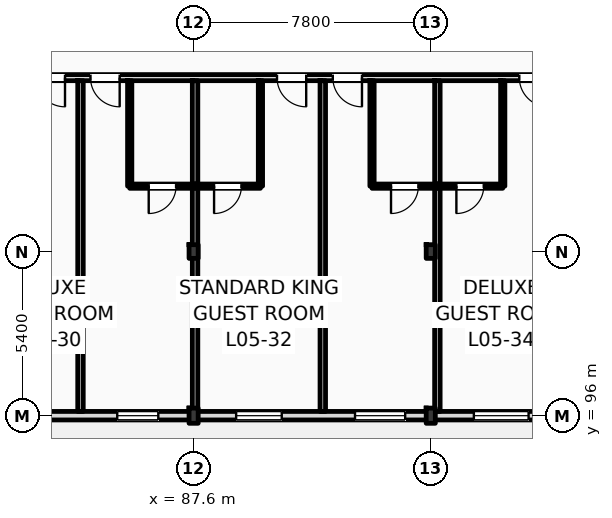
"""IFC4 building model, lengths in metres.
Left out: names, types, materials, properties, quantities, classifications, styles, units other than length and angle.
Written with IfcOpenShell. Run it as: python <this file> out.ifc"""

import sys

from ifc_helpers import new_model, si_unit, direction, frame, frame_2d, origin, origin_2d, place, context, subcontext, project, spatial, rectangle, i_section, extrude, element, fill, save


model = new_model("IFC4")
c1 = context("Model", 3, precision=1e-05, world=origin(), true_north=direction((0.0, 1.0)))
c2 = subcontext(c1, "Body", "Model", "MODEL_VIEW")
j1 = project(units=[si_unit("LENGTHUNIT", "METRE"), si_unit("PLANEANGLEUNIT", "RADIAN")], contexts=[c1])
p1 = place(None, origin())
s1 = spatial("IfcSite", under=j1, at=p1, CompositionType="ELEMENT")
p2 = place(p1, origin())
s2 = spatial("IfcBuilding", under=s1, at=p2, CompositionType="ELEMENT")
p3 = place(p2, frame((0.0, 0.0, 24.6)))
s3 = spatial("IfcBuildingStorey", under=s2, at=p3, CompositionType="ELEMENT", Elevation=24.6)
p4 = place(p3, frame((87.6, 96.0, 0.0), z_axis=(0.0, 0.0, 1.0), x_axis=(1.0, 0.0, 0.0)))
e1 = element("IfcColumn", 1, at=p4, inside=s3, PredefinedType="COLUMN", context=c2, shape_type="SweptSolid", body=[
    extrude(i_section(OverallWidth=0.3, OverallDepth=0.5, WebThickness=0.014, FlangeThickness=0.028, FilletRadius=0.027, at=origin_2d()), origin(), (0.0, 0.0, 1.0), 3.6),
])
p5 = place(p3, frame((87.6, 101.4, 0.0), z_axis=(0.0, 0.0, 1.0), x_axis=(1.0, 0.0, 0.0)))
e2 = element("IfcColumn", 2, at=p5, inside=s3, PredefinedType="COLUMN", context=c2, shape_type="SweptSolid", body=[
    extrude(i_section(OverallWidth=0.3, OverallDepth=0.45, WebThickness=0.014, FlangeThickness=0.026, FilletRadius=0.027, at=origin_2d()), origin(), (0.0, 0.0, 1.0), 3.6),
])
p6 = place(p3, frame((95.4, 96.0, 0.0), z_axis=(0.0, 0.0, 1.0), x_axis=(1.0, 0.0, 0.0)))
e3 = element("IfcColumn", 3, at=p6, inside=s3, PredefinedType="COLUMN", context=c2, shape_type="SweptSolid", body=[
    extrude(i_section(OverallWidth=0.3, OverallDepth=0.5, WebThickness=0.014, FlangeThickness=0.028, FilletRadius=0.027, at=origin_2d()), origin(), (0.0, 0.0, 1.0), 3.6),
])
p7 = place(p3, frame((95.4, 101.4, 0.0), z_axis=(0.0, 0.0, 1.0), x_axis=(1.0, 0.0, 0.0)))
e4 = element("IfcColumn", 4, at=p7, inside=s3, PredefinedType="COLUMN", context=c2, shape_type="SweptSolid", body=[
    extrude(i_section(OverallWidth=0.3, OverallDepth=0.45, WebThickness=0.014, FlangeThickness=0.026, FilletRadius=0.027, at=origin_2d()), origin(), (0.0, 0.0, 1.0), 3.6),
])
p8 = place(p3, frame((25.2, 96.0, 0.0), z_axis=(0.0, 0.0, 1.0), x_axis=(1.0, 0.0, 0.0)))
e5 = element("IfcWall", 5, at=p8, inside=s3, PredefinedType="STANDARD", context=c2, shape_type="SweptSolid", body=[
    extrude(rectangle(XDim=94.8, YDim=0.28, at=frame_2d((47.4, 0.0))), origin(), (0.0, 0.0, 1.0), 2.78),
])
p9 = place(p8, frame((16.539, 0.0, 0.9)))
e6 = element("IfcOpeningElement", 6, at=p9, cuts=e5, PredefinedType="OPENING", context=c2, shape_type="SweptSolid", body=[
    extrude(rectangle(XDim=1.75, YDim=1.7, at=frame_2d((0.875, 0.85))), frame((0.0, 0.15, 0.0), z_axis=(0.0, -1.0, 0.0), x_axis=(1.0, 0.0, 0.0)), (0.0, 0.0, 1.0), 0.3),
])
p10 = place(p8, frame((20.367, 0.0, 0.9)))
e7 = element("IfcOpeningElement", 7, at=p10, cuts=e5, PredefinedType="OPENING", context=c2, shape_type="SweptSolid", body=[
    extrude(rectangle(XDim=2.0, YDim=1.7, at=frame_2d((1.0, 0.85))), frame((0.0, 0.15, 0.0), z_axis=(0.0, -1.0, 0.0), x_axis=(1.0, 0.0, 0.0)), (0.0, 0.0, 1.0), 0.3),
])
p11 = place(p8, frame((24.326, 0.0, 0.9)))
e8 = element("IfcOpeningElement", 8, at=p11, cuts=e5, PredefinedType="OPENING", context=c2, shape_type="SweptSolid", body=[
    extrude(rectangle(XDim=2.3, YDim=1.7, at=frame_2d((1.15, 0.85))), frame((0.0, 0.15, 0.0), z_axis=(0.0, -1.0, 0.0), x_axis=(1.0, 0.0, 0.0)), (0.0, 0.0, 1.0), 0.3),
])
p12 = place(p8, frame((27.684, 0.0, 0.9)))
e9 = element("IfcOpeningElement", 9, at=p12, cuts=e5, PredefinedType="OPENING", context=c2, shape_type="SweptSolid", body=[
    extrude(rectangle(XDim=2.6, YDim=1.7, at=frame_2d((1.3, 0.85))), frame((0.0, 0.15, 0.0), z_axis=(0.0, -1.0, 0.0), x_axis=(1.0, 0.0, 0.0)), (0.0, 0.0, 1.0), 0.3),
])
p13 = place(p8, frame((32.083, 0.0, 0.9)))
e10 = element("IfcOpeningElement", 10, at=p13, cuts=e5, PredefinedType="OPENING", context=c2, shape_type="SweptSolid", body=[
    extrude(rectangle(XDim=2.419, YDim=1.7, at=frame_2d((1.209, 0.85))), frame((0.0, 0.15, 0.0), z_axis=(0.0, -1.0, 0.0), x_axis=(1.0, 0.0, 0.0)), (0.0, 0.0, 1.0), 0.3),
])
p14 = place(p8, frame((35.322, 0.0, 0.9)))
e11 = element("IfcOpeningElement", 11, at=p14, cuts=e5, PredefinedType="OPENING", context=c2, shape_type="SweptSolid", body=[
    extrude(rectangle(XDim=2.868, YDim=1.7, at=frame_2d((1.434, 0.85))), frame((0.0, 0.15, 0.0), z_axis=(0.0, -1.0, 0.0), x_axis=(1.0, 0.0, 0.0)), (0.0, 0.0, 1.0), 0.3),
])
p15 = place(p8, frame((56.015, 0.0, 0.9)))
e12 = element("IfcOpeningElement", 12, at=p15, cuts=e5, PredefinedType="OPENING", context=c2, shape_type="SweptSolid", body=[
    extrude(rectangle(XDim=1.2, YDim=1.7, at=frame_2d((0.6, 0.85))), frame((0.0, 0.15, 0.0), z_axis=(0.0, -1.0, 0.0), x_axis=(1.0, 0.0, 0.0)), (0.0, 0.0, 1.0), 0.3),
])
p16 = place(p8, frame((59.888, 0.0, 0.9)))
e13 = element("IfcOpeningElement", 13, at=p16, cuts=e5, PredefinedType="OPENING", context=c2, shape_type="SweptSolid", body=[
    extrude(rectangle(XDim=1.35, YDim=1.7, at=frame_2d((0.675, 0.85))), frame((0.0, 0.15, 0.0), z_axis=(0.0, -1.0, 0.0), x_axis=(1.0, 0.0, 0.0)), (0.0, 0.0, 1.0), 0.3),
])
p17 = place(p8, frame((63.799, 0.0, 0.9)))
e14 = element("IfcOpeningElement", 14, at=p17, cuts=e5, PredefinedType="OPENING", context=c2, shape_type="SweptSolid", body=[
    extrude(rectangle(XDim=1.5, YDim=1.7, at=frame_2d((0.75, 0.85))), frame((0.0, 0.15, 0.0), z_axis=(0.0, -1.0, 0.0), x_axis=(1.0, 0.0, 0.0)), (0.0, 0.0, 1.0), 0.3),
])
p18 = place(p8, frame((67.709, 0.0, 0.9)))
e15 = element("IfcOpeningElement", 15, at=p18, cuts=e5, PredefinedType="OPENING", context=c2, shape_type="SweptSolid", body=[
    extrude(rectangle(XDim=1.65, YDim=1.7, at=frame_2d((0.825, 0.85))), frame((0.0, 0.15, 0.0), z_axis=(0.0, -1.0, 0.0), x_axis=(1.0, 0.0, 0.0)), (0.0, 0.0, 1.0), 0.3),
])
p19 = place(p8, frame((71.618, 0.0, 0.9)))
e16 = element("IfcOpeningElement", 16, at=p19, cuts=e5, PredefinedType="OPENING", context=c2, shape_type="SweptSolid", body=[
    extrude(rectangle(XDim=1.8, YDim=1.7, at=frame_2d((0.9, 0.85))), frame((0.0, 0.15, 0.0), z_axis=(0.0, -1.0, 0.0), x_axis=(1.0, 0.0, 0.0)), (0.0, 0.0, 1.0), 0.3),
])
p20 = place(p8, frame((75.129, 0.0, 0.9)))
e17 = element("IfcOpeningElement", 17, at=p20, cuts=e5, PredefinedType="OPENING", context=c2, shape_type="SweptSolid", body=[
    extrude(rectangle(XDim=1.95, YDim=1.7, at=frame_2d((0.975, 0.85))), frame((0.0, 0.15, 0.0), z_axis=(0.0, -1.0, 0.0), x_axis=(1.0, 0.0, 0.0)), (0.0, 0.0, 1.0), 0.3),
])
p21 = place(p8, frame((79.439, 0.0, 0.9)))
e18 = element("IfcOpeningElement", 18, at=p21, cuts=e5, PredefinedType="OPENING", context=c2, shape_type="SweptSolid", body=[
    extrude(rectangle(XDim=2.1, YDim=1.7, at=frame_2d((1.05, 0.85))), frame((0.0, 0.15, 0.0), z_axis=(0.0, -1.0, 0.0), x_axis=(1.0, 0.0, 0.0)), (0.0, 0.0, 1.0), 0.3),
])
p22 = place(p8, frame((83.349, 0.0, 0.9)))
e19 = element("IfcOpeningElement", 19, at=p22, cuts=e5, PredefinedType="OPENING", context=c2, shape_type="SweptSolid", body=[
    extrude(rectangle(XDim=2.25, YDim=1.7, at=frame_2d((1.125, 0.85))), frame((0.0, 0.15, 0.0), z_axis=(0.0, -1.0, 0.0), x_axis=(1.0, 0.0, 0.0)), (0.0, 0.0, 1.0), 0.3),
])
p23 = place(p8, frame((87.258, 0.0, 0.9)))
e20 = element("IfcOpeningElement", 20, at=p23, cuts=e5, PredefinedType="OPENING", context=c2, shape_type="SweptSolid", body=[
    extrude(rectangle(XDim=2.4, YDim=1.7, at=frame_2d((1.2, 0.85))), frame((0.0, 0.15, 0.0), z_axis=(0.0, -1.0, 0.0), x_axis=(1.0, 0.0, 0.0)), (0.0, 0.0, 1.0), 0.3),
])
p24 = place(p8, frame((91.204, 0.0, 0.9)))
e21 = element("IfcOpeningElement", 21, at=p24, cuts=e5, PredefinedType="OPENING", context=c2, shape_type="SweptSolid", body=[
    extrude(rectangle(XDim=2.55, YDim=1.7, at=frame_2d((1.275, 0.85))), frame((0.0, 0.15, 0.0), z_axis=(0.0, -1.0, 0.0), x_axis=(1.0, 0.0, 0.0)), (0.0, 0.0, 1.0), 0.3),
])
p25 = place(p3, frame((79.76, 107.12, 0.0), z_axis=(0.0, 0.0, 1.0), x_axis=(1.0, 0.0, 0.0)))
e22 = element("IfcWall", 22, at=p25, inside=s3, PredefinedType="PARTITIONING", context=c2, shape_type="SweptSolid", body=[
    extrude(rectangle(XDim=40.1, YDim=0.2, at=frame_2d((20.05, 0.0))), origin(), (0.0, 0.0, 1.0), 3.34),
])
p26 = place(p25, frame((2.65, 0.0, 0.0)))
e23 = element("IfcOpeningElement", 23, at=p26, cuts=e22, PredefinedType="OPENING", context=c2, shape_type="SweptSolid", body=[
    extrude(rectangle(XDim=0.96, YDim=2.2, at=frame_2d((0.48, 1.1))), frame((0.0, 0.11, 0.0), z_axis=(0.0, -1.0, 0.0), x_axis=(1.0, 0.0, 0.0)), (0.0, 0.0, 1.0), 0.22),
])
p27 = place(p25, frame((4.448, 0.0, 0.0)))
e24 = element("IfcOpeningElement", 24, at=p27, cuts=e22, PredefinedType="OPENING", context=c2, shape_type="SweptSolid", body=[
    extrude(rectangle(XDim=0.96, YDim=2.2, at=frame_2d((0.48, 1.1))), frame((0.0, 0.11, 0.0), z_axis=(0.0, -1.0, 0.0), x_axis=(1.0, 0.0, 0.0)), (0.0, 0.0, 1.0), 0.22),
])
p28 = place(p25, frame((10.583, 0.0, 0.0)))
e25 = element("IfcOpeningElement", 25, at=p28, cuts=e22, PredefinedType="OPENING", context=c2, shape_type="SweptSolid", body=[
    extrude(rectangle(XDim=0.96, YDim=2.2, at=frame_2d((0.48, 1.1))), frame((0.0, 0.11, 0.0), z_axis=(0.0, -1.0, 0.0), x_axis=(1.0, 0.0, 0.0)), (0.0, 0.0, 1.0), 0.22),
])
p29 = place(p25, frame((12.418, 0.0, 0.0)))
e26 = element("IfcOpeningElement", 26, at=p29, cuts=e22, PredefinedType="OPENING", context=c2, shape_type="SweptSolid", body=[
    extrude(rectangle(XDim=0.96, YDim=2.2, at=frame_2d((0.48, 1.1))), frame((0.0, 0.11, 0.0), z_axis=(0.0, -1.0, 0.0), x_axis=(1.0, 0.0, 0.0)), (0.0, 0.0, 1.0), 0.22),
])
p30 = place(p25, frame((18.553, 0.0, 0.0)))
e27 = element("IfcOpeningElement", 27, at=p30, cuts=e22, PredefinedType="OPENING", context=c2, shape_type="SweptSolid", body=[
    extrude(rectangle(XDim=0.96, YDim=2.2, at=frame_2d((0.48, 1.1))), frame((0.0, 0.11, 0.0), z_axis=(0.0, -1.0, 0.0), x_axis=(1.0, 0.0, 0.0)), (0.0, 0.0, 1.0), 0.22),
])
p31 = place(p25, frame((20.388, 0.0, 0.0)))
e28 = element("IfcOpeningElement", 28, at=p31, cuts=e22, PredefinedType="OPENING", context=c2, shape_type="SweptSolid", body=[
    extrude(rectangle(XDim=0.96, YDim=2.2, at=frame_2d((0.48, 1.1))), frame((0.0, 0.11, 0.0), z_axis=(0.0, -1.0, 0.0), x_axis=(1.0, 0.0, 0.0)), (0.0, 0.0, 1.0), 0.22),
])
p32 = place(p25, frame((26.523, 0.0, 0.0)))
e29 = element("IfcOpeningElement", 29, at=p32, cuts=e22, PredefinedType="OPENING", context=c2, shape_type="SweptSolid", body=[
    extrude(rectangle(XDim=0.96, YDim=2.2, at=frame_2d((0.48, 1.1))), frame((0.0, 0.11, 0.0), z_axis=(0.0, -1.0, 0.0), x_axis=(1.0, 0.0, 0.0)), (0.0, 0.0, 1.0), 0.22),
])
p33 = place(p25, frame((28.358, 0.0, 0.0)))
e30 = element("IfcOpeningElement", 30, at=p33, cuts=e22, PredefinedType="OPENING", context=c2, shape_type="SweptSolid", body=[
    extrude(rectangle(XDim=0.96, YDim=2.2, at=frame_2d((0.48, 1.1))), frame((0.0, 0.11, 0.0), z_axis=(0.0, -1.0, 0.0), x_axis=(1.0, 0.0, 0.0)), (0.0, 0.0, 1.0), 0.22),
])
p34 = place(p25, frame((34.493, 0.0, 0.0)))
e31 = element("IfcOpeningElement", 31, at=p34, cuts=e22, PredefinedType="OPENING", context=c2, shape_type="SweptSolid", body=[
    extrude(rectangle(XDim=0.96, YDim=2.2, at=frame_2d((0.48, 1.1))), frame((0.0, 0.11, 0.0), z_axis=(0.0, -1.0, 0.0), x_axis=(1.0, 0.0, 0.0)), (0.0, 0.0, 1.0), 0.22),
])
p35 = place(p25, frame((36.364, 0.0, 0.0)))
e32 = element("IfcOpeningElement", 32, at=p35, cuts=e22, PredefinedType="OPENING", context=c2, shape_type="SweptSolid", body=[
    extrude(rectangle(XDim=0.96, YDim=2.2, at=frame_2d((0.48, 1.1))), frame((0.0, 0.11, 0.0), z_axis=(0.0, -1.0, 0.0), x_axis=(1.0, 0.0, 0.0)), (0.0, 0.0, 1.0), 0.22),
])
p36 = place(p3, frame((83.879, 96.14, 0.0), z_axis=(0.0, 0.0, 1.0), x_axis=(0.0, 1.0, 0.0)))
e33 = element("IfcWall", 33, at=p36, inside=s3, PredefinedType="PARTITIONING", context=c2, shape_type="SweptSolid", body=[
    extrude(rectangle(XDim=10.88, YDim=0.18, at=frame_2d((5.44, 0.0))), origin(), (0.0, 0.0, 1.0), 3.34),
])
p37 = place(p3, frame((87.648, 96.14, 0.0), z_axis=(0.0, 0.0, 1.0), x_axis=(0.0, 1.0, 0.0)))
e34 = element("IfcWall", 34, at=p37, inside=s3, PredefinedType="PARTITIONING", context=c2, shape_type="SweptSolid", body=[
    extrude(rectangle(XDim=10.88, YDim=0.18, at=frame_2d((5.44, 0.0))), origin(), (0.0, 0.0, 1.0), 2.93),
])
p38 = place(p3, frame((85.498, 103.55, 0.0), z_axis=(0.0, 0.0, 1.0), x_axis=(0.0, 1.0, 0.0)))
e35 = element("IfcWall", 35, at=p38, inside=s3, PredefinedType="PARTITIONING", context=c2, shape_type="SweptSolid", body=[
    extrude(rectangle(XDim=3.47, YDim=0.14, at=frame_2d((1.735, 0.0))), origin(), (0.0, 0.0, 1.0), 3.34),
])
p39 = place(p3, frame((85.498, 103.55, 0.0), z_axis=(0.0, 0.0, 1.0), x_axis=(1.0, 0.0, 0.0)))
e36 = element("IfcWall", 36, at=p39, inside=s3, PredefinedType="PARTITIONING", context=c2, shape_type="SweptSolid", body=[
    extrude(rectangle(XDim=2.15, YDim=0.14, at=frame_2d((1.075, 0.0))), origin(), (0.0, 0.0, 1.0), 3.34),
])
p40 = place(p39, frame((0.625, 0.0, 0.0)))
e37 = element("IfcOpeningElement", 37, at=p40, cuts=e36, PredefinedType="OPENING", context=c2, shape_type="SweptSolid", body=[
    extrude(rectangle(XDim=0.9, YDim=2.1, at=frame_2d((0.45, 1.05))), frame((0.0, 0.08, 0.0), z_axis=(0.0, -1.0, 0.0), x_axis=(1.0, 0.0, 0.0)), (0.0, 0.0, 1.0), 0.16),
])
p41 = place(p3, frame((91.849, 96.14, 0.0), z_axis=(0.0, 0.0, 1.0), x_axis=(0.0, 1.0, 0.0)))
e38 = element("IfcWall", 38, at=p41, inside=s3, PredefinedType="PARTITIONING", context=c2, shape_type="SweptSolid", body=[
    extrude(rectangle(XDim=10.88, YDim=0.18, at=frame_2d((5.44, 0.0))), origin(), (0.0, 0.0, 1.0), 3.34),
])
p42 = place(p3, frame((89.798, 103.55, 0.0), z_axis=(0.0, 0.0, 1.0), x_axis=(0.0, 1.0, 0.0)))
e39 = element("IfcWall", 39, at=p42, inside=s3, PredefinedType="PARTITIONING", context=c2, shape_type="SweptSolid", body=[
    extrude(rectangle(XDim=3.47, YDim=0.14, at=frame_2d((1.735, 0.0))), origin(), (0.0, 0.0, 1.0), 3.34),
])
p43 = place(p3, frame((87.648, 103.55, 0.0), z_axis=(0.0, 0.0, 1.0), x_axis=(1.0, 0.0, 0.0)))
e40 = element("IfcWall", 40, at=p43, inside=s3, PredefinedType="PARTITIONING", context=c2, shape_type="SweptSolid", body=[
    extrude(rectangle(XDim=2.15, YDim=0.14, at=frame_2d((1.075, 0.0))), origin(), (0.0, 0.0, 1.0), 3.34),
])
p44 = place(p43, frame((0.625, 0.0, 0.0)))
e41 = element("IfcOpeningElement", 41, at=p44, cuts=e40, PredefinedType="OPENING", context=c2, shape_type="SweptSolid", body=[
    extrude(rectangle(XDim=0.9, YDim=2.1, at=frame_2d((0.45, 1.05))), frame((0.0, 0.08, 0.0), z_axis=(0.0, -1.0, 0.0), x_axis=(1.0, 0.0, 0.0)), (0.0, 0.0, 1.0), 0.16),
])
p45 = place(p3, frame((95.618, 96.14, 0.0), z_axis=(0.0, 0.0, 1.0), x_axis=(0.0, 1.0, 0.0)))
e42 = element("IfcWall", 42, at=p45, inside=s3, PredefinedType="PARTITIONING", context=c2, shape_type="SweptSolid", body=[
    extrude(rectangle(XDim=10.88, YDim=0.18, at=frame_2d((5.44, 0.0))), origin(), (0.0, 0.0, 1.0), 2.93),
])
p46 = place(p3, frame((93.468, 103.55, 0.0), z_axis=(0.0, 0.0, 1.0), x_axis=(0.0, 1.0, 0.0)))
e43 = element("IfcWall", 43, at=p46, inside=s3, PredefinedType="PARTITIONING", context=c2, shape_type="SweptSolid", body=[
    extrude(rectangle(XDim=3.47, YDim=0.14, at=frame_2d((1.735, 0.0))), origin(), (0.0, 0.0, 1.0), 3.34),
])
p47 = place(p3, frame((93.468, 103.55, 0.0), z_axis=(0.0, 0.0, 1.0), x_axis=(1.0, 0.0, 0.0)))
e44 = element("IfcWall", 44, at=p47, inside=s3, PredefinedType="PARTITIONING", context=c2, shape_type="SweptSolid", body=[
    extrude(rectangle(XDim=2.15, YDim=0.14, at=frame_2d((1.075, 0.0))), origin(), (0.0, 0.0, 1.0), 3.34),
])
p48 = place(p47, frame((0.625, 0.0, 0.0)))
e45 = element("IfcOpeningElement", 45, at=p48, cuts=e44, PredefinedType="OPENING", context=c2, shape_type="SweptSolid", body=[
    extrude(rectangle(XDim=0.9, YDim=2.1, at=frame_2d((0.45, 1.05))), frame((0.0, 0.08, 0.0), z_axis=(0.0, -1.0, 0.0), x_axis=(1.0, 0.0, 0.0)), (0.0, 0.0, 1.0), 0.16),
])
p49 = place(p3, frame((97.768, 103.55, 0.0), z_axis=(0.0, 0.0, 1.0), x_axis=(0.0, 1.0, 0.0)))
e46 = element("IfcWall", 46, at=p49, inside=s3, PredefinedType="PARTITIONING", context=c2, shape_type="SweptSolid", body=[
    extrude(rectangle(XDim=3.47, YDim=0.14, at=frame_2d((1.735, 0.0))), origin(), (0.0, 0.0, 1.0), 3.34),
])
p50 = place(p3, frame((95.618, 103.55, 0.0), z_axis=(0.0, 0.0, 1.0), x_axis=(1.0, 0.0, 0.0)))
e47 = element("IfcWall", 47, at=p50, inside=s3, PredefinedType="PARTITIONING", context=c2, shape_type="SweptSolid", body=[
    extrude(rectangle(XDim=2.15, YDim=0.14, at=frame_2d((1.075, 0.0))), origin(), (0.0, 0.0, 1.0), 3.34),
])
p51 = place(p50, frame((0.625, 0.0, 0.0)))
e48 = element("IfcOpeningElement", 48, at=p51, cuts=e47, PredefinedType="OPENING", context=c2, shape_type="SweptSolid", body=[
    extrude(rectangle(XDim=0.9, YDim=2.1, at=frame_2d((0.45, 1.05))), frame((0.0, 0.08, 0.0), z_axis=(0.0, -1.0, 0.0), x_axis=(1.0, 0.0, 0.0)), (0.0, 0.0, 1.0), 0.16),
])
p52 = place(p16, origin())
e49 = element("IfcWindow", 49, at=p52, inside=s3, PartitioningType="DOUBLE_PANEL_VERTICAL", PredefinedType="WINDOW", context=c2, shape_type="SweptSolid", body=[
    extrude(rectangle(XDim=1.35, YDim=1.7, at=frame_2d((0.675, 0.85))), frame((0.0, 0.03, 0.0), z_axis=(0.0, -1.0, 0.0), x_axis=(1.0, 0.0, 0.0)), (0.0, 0.0, 1.0), 0.06),
])
fill(e13, e49)
p53 = place(p17, origin())
e50 = element("IfcWindow", 50, at=p53, inside=s3, PartitioningType="DOUBLE_PANEL_VERTICAL", PredefinedType="WINDOW", context=c2, shape_type="SweptSolid", body=[
    extrude(rectangle(XDim=1.5, YDim=1.7, at=frame_2d((0.75, 0.85))), frame((0.0, 0.03, 0.0), z_axis=(0.0, -1.0, 0.0), x_axis=(1.0, 0.0, 0.0)), (0.0, 0.0, 1.0), 0.06),
])
fill(e14, e50)
p54 = place(p18, origin())
e51 = element("IfcWindow", 51, at=p54, inside=s3, PartitioningType="DOUBLE_PANEL_VERTICAL", PredefinedType="WINDOW", context=c2, shape_type="SweptSolid", body=[
    extrude(rectangle(XDim=1.65, YDim=1.7, at=frame_2d((0.825, 0.85))), frame((0.0, 0.03, 0.0), z_axis=(0.0, -1.0, 0.0), x_axis=(1.0, 0.0, 0.0)), (0.0, 0.0, 1.0), 0.06),
])
fill(e15, e51)
p55 = place(p19, origin())
e52 = element("IfcWindow", 52, at=p55, inside=s3, PartitioningType="DOUBLE_PANEL_VERTICAL", PredefinedType="WINDOW", context=c2, shape_type="SweptSolid", body=[
    extrude(rectangle(XDim=1.8, YDim=1.7, at=frame_2d((0.9, 0.85))), frame((0.0, 0.03, 0.0), z_axis=(0.0, -1.0, 0.0), x_axis=(1.0, 0.0, 0.0)), (0.0, 0.0, 1.0), 0.06),
])
fill(e16, e52)
p56 = place(p26, frame((0.96, 0.0, 0.0), z_axis=(0.0, 0.0, 1.0), x_axis=(-1.0, 0.0, 0.0)))
e53 = element("IfcDoor", 53, at=p56, inside=s3, OperationType="SINGLE_SWING_RIGHT", PredefinedType="DOOR", context=c2, shape_type="SweptSolid", body=[
    extrude(rectangle(XDim=0.96, YDim=2.2, at=frame_2d((0.48, 1.1))), frame((0.0, 0.025, 0.0), z_axis=(0.0, -1.0, 0.0), x_axis=(1.0, 0.0, 0.0)), (0.0, 0.0, 1.0), 0.05),
])
fill(e23, e53)
p57 = place(p27, frame((0.96, 0.0, 0.0), z_axis=(0.0, 0.0, 1.0), x_axis=(-1.0, 0.0, 0.0)))
e54 = element("IfcDoor", 54, at=p57, inside=s3, OperationType="SINGLE_SWING_RIGHT", PredefinedType="DOOR", context=c2, shape_type="SweptSolid", body=[
    extrude(rectangle(XDim=0.96, YDim=2.2, at=frame_2d((0.48, 1.1))), frame((0.0, 0.025, 0.0), z_axis=(0.0, -1.0, 0.0), x_axis=(1.0, 0.0, 0.0)), (0.0, 0.0, 1.0), 0.05),
])
fill(e24, e54)
p58 = place(p40, frame((0.9, 0.0, 0.0), z_axis=(0.0, 0.0, 1.0), x_axis=(-1.0, 0.0, 0.0)))
e55 = element("IfcDoor", 55, at=p58, inside=s3, OperationType="SINGLE_SWING_LEFT", PredefinedType="DOOR", context=c2, shape_type="SweptSolid", body=[
    extrude(rectangle(XDim=0.9, YDim=2.1, at=frame_2d((0.45, 1.05))), frame((0.0, 0.025, 0.0), z_axis=(0.0, -1.0, 0.0), x_axis=(1.0, 0.0, 0.0)), (0.0, 0.0, 1.0), 0.05),
])
fill(e37, e55)
p59 = place(p28, frame((0.96, 0.0, 0.0), z_axis=(0.0, 0.0, 1.0), x_axis=(-1.0, 0.0, 0.0)))
e56 = element("IfcDoor", 56, at=p59, inside=s3, OperationType="SINGLE_SWING_RIGHT", PredefinedType="DOOR", context=c2, shape_type="SweptSolid", body=[
    extrude(rectangle(XDim=0.96, YDim=2.2, at=frame_2d((0.48, 1.1))), frame((0.0, 0.025, 0.0), z_axis=(0.0, -1.0, 0.0), x_axis=(1.0, 0.0, 0.0)), (0.0, 0.0, 1.0), 0.05),
])
fill(e25, e56)
p60 = place(p44, frame((0.9, 0.0, 0.0), z_axis=(0.0, 0.0, 1.0), x_axis=(-1.0, 0.0, 0.0)))
e57 = element("IfcDoor", 57, at=p60, inside=s3, OperationType="SINGLE_SWING_LEFT", PredefinedType="DOOR", context=c2, shape_type="SweptSolid", body=[
    extrude(rectangle(XDim=0.9, YDim=2.1, at=frame_2d((0.45, 1.05))), frame((0.0, 0.025, 0.0), z_axis=(0.0, -1.0, 0.0), x_axis=(1.0, 0.0, 0.0)), (0.0, 0.0, 1.0), 0.05),
])
fill(e41, e57)
p61 = place(p29, frame((0.96, 0.0, 0.0), z_axis=(0.0, 0.0, 1.0), x_axis=(-1.0, 0.0, 0.0)))
e58 = element("IfcDoor", 58, at=p61, inside=s3, OperationType="SINGLE_SWING_RIGHT", PredefinedType="DOOR", context=c2, shape_type="SweptSolid", body=[
    extrude(rectangle(XDim=0.96, YDim=2.2, at=frame_2d((0.48, 1.1))), frame((0.0, 0.025, 0.0), z_axis=(0.0, -1.0, 0.0), x_axis=(1.0, 0.0, 0.0)), (0.0, 0.0, 1.0), 0.05),
])
fill(e26, e58)
p62 = place(p48, frame((0.9, 0.0, 0.0), z_axis=(0.0, 0.0, 1.0), x_axis=(-1.0, 0.0, 0.0)))
e59 = element("IfcDoor", 59, at=p62, inside=s3, OperationType="SINGLE_SWING_LEFT", PredefinedType="DOOR", context=c2, shape_type="SweptSolid", body=[
    extrude(rectangle(XDim=0.9, YDim=2.1, at=frame_2d((0.45, 1.05))), frame((0.0, 0.025, 0.0), z_axis=(0.0, -1.0, 0.0), x_axis=(1.0, 0.0, 0.0)), (0.0, 0.0, 1.0), 0.05),
])
fill(e45, e59)
p63 = place(p30, frame((0.96, 0.0, 0.0), z_axis=(0.0, 0.0, 1.0), x_axis=(-1.0, 0.0, 0.0)))
e60 = element("IfcDoor", 60, at=p63, inside=s3, OperationType="SINGLE_SWING_RIGHT", PredefinedType="DOOR", context=c2, shape_type="SweptSolid", body=[
    extrude(rectangle(XDim=0.96, YDim=2.2, at=frame_2d((0.48, 1.1))), frame((0.0, 0.025, 0.0), z_axis=(0.0, -1.0, 0.0), x_axis=(1.0, 0.0, 0.0)), (0.0, 0.0, 1.0), 0.05),
])
fill(e27, e60)
p64 = place(p51, frame((0.9, 0.0, 0.0), z_axis=(0.0, 0.0, 1.0), x_axis=(-1.0, 0.0, 0.0)))
e61 = element("IfcDoor", 61, at=p64, inside=s3, OperationType="SINGLE_SWING_LEFT", PredefinedType="DOOR", context=c2, shape_type="SweptSolid", body=[
    extrude(rectangle(XDim=0.9, YDim=2.1, at=frame_2d((0.45, 1.05))), frame((0.0, 0.025, 0.0), z_axis=(0.0, -1.0, 0.0), x_axis=(1.0, 0.0, 0.0)), (0.0, 0.0, 1.0), 0.05),
])
fill(e48, e61)
save(model, sys.argv[1])
